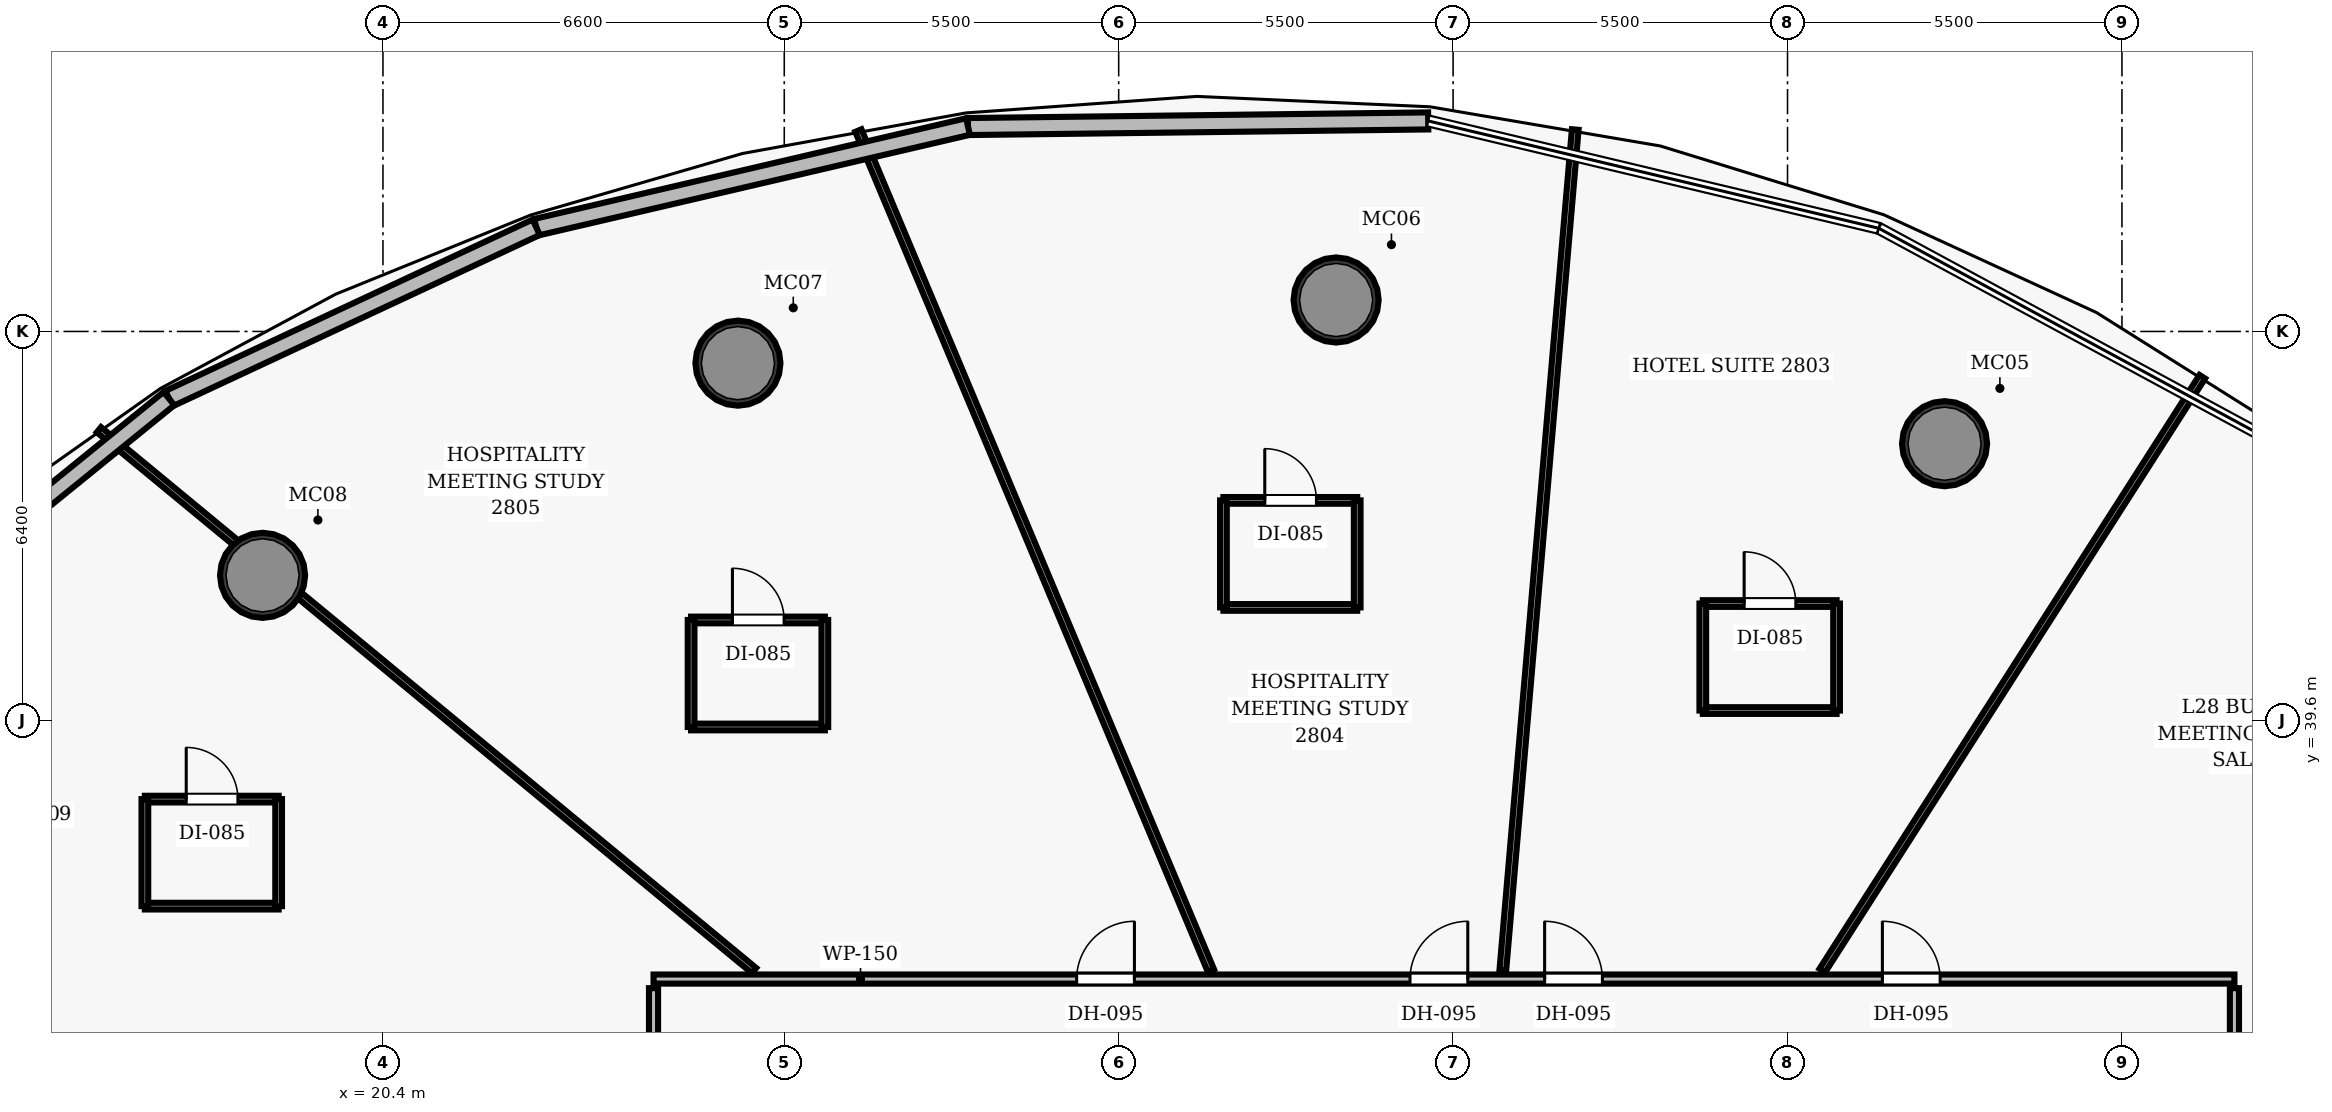
"""IFC4 building model, lengths in metres.
Left out: names, types, materials, properties, quantities, classifications, styles, units other than length and angle.
Written with IfcOpenShell. Run it as: python <this file> out.ifc"""

import sys

from ifc_helpers import new_model, si_unit, direction, frame, frame_2d, origin, origin_2d, place, context, subcontext, project, spatial, rectangle, hollow_circle, extrude, element, fill, save


model = new_model("IFC4")
c1 = context("Model", 3, precision=1e-05, world=origin(), true_north=direction((0.0, 1.0)))
c2 = subcontext(c1, "Body", "Model", "MODEL_VIEW")
j1 = project(units=[si_unit("LENGTHUNIT", "METRE"), si_unit("PLANEANGLEUNIT", "RADIAN")], contexts=[c1])
p1 = place(None, origin())
s1 = spatial("IfcSite", under=j1, at=p1, CompositionType="ELEMENT")
p2 = place(p1, origin())
s2 = spatial("IfcBuilding", under=s1, at=p2, CompositionType="ELEMENT")
p3 = place(p2, frame((0.0, 0.0, 116.8)))
s3 = spatial("IfcBuildingStorey", under=s2, at=p3, CompositionType="ELEMENT", Elevation=116.8)
for number, where, z_axis, x_axis in (
    (1, (46.083, 44.154, 0.0), (0.0, 0.0, 1.0), (1.0, 0.0, 0.0)),
    (2, (36.076, 46.517, 0.0), (0.0, 0.0, 1.0), (1.0, 0.0, 0.0)),
    (3, (26.238, 45.479, 0.0), (0.0, 0.0, 1.0), (1.0, 0.0, 0.0)),
    (4, (18.42, 41.989, 0.0), (0.0, 0.0, 1.0), (1.0, 0.0, 0.0)),
):
    element("IfcColumn", number, at=place(p3, frame(where, z_axis=z_axis, x_axis=x_axis)), inside=s3, PredefinedType="COLUMN", context=c2, shape_type="SweptSolid", body=[
        extrude(hollow_circle(Radius=0.7, WallThickness=0.055, at=origin_2d()), origin(), (0.0, 0.0, 1.0), 3.5),
    ])
p4 = place(p3, frame((24.85, 35.35, 0.0), z_axis=(0.0, 0.0, 1.0), x_axis=(1.0, 0.0, 0.0)))
e5 = element("IfcWall", 5, at=p4, inside=s3, PredefinedType="PARTITIONING", context=c2, shape_type="SweptSolid", body=[
    extrude(rectangle(XDim=26.0, YDim=0.15, at=frame_2d((13.0, 0.0))), origin(), (0.0, 0.0, 1.0), 2.675),
])
p5 = place(p4, frame((20.21, 0.0, 0.0)))
e6 = element("IfcOpeningElement", 6, at=p5, cuts=e5, PredefinedType="OPENING", context=c2, shape_type="SweptSolid", body=[
    extrude(rectangle(XDim=0.95, YDim=2.15, at=frame_2d((0.475, 1.075))), frame((0.0, 0.085, 0.0), z_axis=(0.0, -1.0, 0.0), x_axis=(1.0, 0.0, 0.0)), (0.0, 0.0, 1.0), 0.17),
])
p6 = place(p4, frame((14.655, 0.0, 0.0)))
e7 = element("IfcOpeningElement", 7, at=p6, cuts=e5, PredefinedType="OPENING", context=c2, shape_type="SweptSolid", body=[
    extrude(rectangle(XDim=0.95, YDim=2.15, at=frame_2d((0.475, 1.075))), frame((0.0, 0.085, 0.0), z_axis=(0.0, -1.0, 0.0), x_axis=(1.0, 0.0, 0.0)), (0.0, 0.0, 1.0), 0.17),
])
p7 = place(p4, frame((12.441, 0.0, 0.0)))
e8 = element("IfcOpeningElement", 8, at=p7, cuts=e5, PredefinedType="OPENING", context=c2, shape_type="SweptSolid", body=[
    extrude(rectangle(XDim=0.95, YDim=2.15, at=frame_2d((0.475, 1.075))), frame((0.0, 0.085, 0.0), z_axis=(0.0, -1.0, 0.0), x_axis=(1.0, 0.0, 0.0)), (0.0, 0.0, 1.0), 0.17),
])
p8 = place(p4, frame((6.959, 0.0, 0.0)))
e9 = element("IfcOpeningElement", 9, at=p8, cuts=e5, PredefinedType="OPENING", context=c2, shape_type="SweptSolid", body=[
    extrude(rectangle(XDim=0.95, YDim=2.15, at=frame_2d((0.475, 1.075))), frame((0.0, 0.085, 0.0), z_axis=(0.0, -1.0, 0.0), x_axis=(1.0, 0.0, 0.0)), (0.0, 0.0, 1.0), 0.17),
])
p9 = place(p3, frame((24.85, 27.08, 0.0), z_axis=(0.0, 0.0, 1.0), x_axis=(0.0, 1.0, 0.0)))
e10 = element("IfcWall", 10, at=p9, inside=s3, PredefinedType="PARTITIONING", context=c2, shape_type="SweptSolid", body=[
    extrude(rectangle(XDim=8.12, YDim=0.15, at=frame_2d((4.06, 0.0))), origin(), (0.0, 0.0, 1.0), 2.675),
])
p10 = place(p9, frame((4.288, 0.0, 0.0)))
e11 = element("IfcOpeningElement", 11, at=p10, cuts=e10, PredefinedType="OPENING", context=c2, shape_type="SweptSolid", body=[
    extrude(rectangle(XDim=0.95, YDim=2.15, at=frame_2d((0.475, 1.075))), frame((0.0, 0.085, 0.0), z_axis=(0.0, -1.0, 0.0), x_axis=(1.0, 0.0, 0.0)), (0.0, 0.0, 1.0), 0.17),
])
p11 = place(p3, frame((50.85, 27.08, 0.0), z_axis=(0.0, 0.0, 1.0), x_axis=(0.0, 1.0, 0.0)))
e12 = element("IfcWall", 12, at=p11, inside=s3, PredefinedType="PARTITIONING", context=c2, shape_type="SweptSolid", body=[
    extrude(rectangle(XDim=8.12, YDim=0.15, at=frame_2d((4.06, 0.0))), origin(), (0.0, 0.0, 1.0), 2.675),
])
p12 = place(p11, frame((1.179, 0.0, 0.0)))
e13 = element("IfcOpeningElement", 13, at=p12, cuts=e12, PredefinedType="OPENING", context=c2, shape_type="SweptSolid", body=[
    extrude(rectangle(XDim=0.95, YDim=2.15, at=frame_2d((0.475, 1.075))), frame((0.0, 0.085, 0.0), z_axis=(0.0, -1.0, 0.0), x_axis=(1.0, 0.0, 0.0)), (0.0, 0.0, 1.0), 0.17),
])
p13 = place(p3, frame((50.99, 33.407, 0.0), z_axis=(0.0, 0.0, 1.0), x_axis=(0.868694051494, 0.495349013221, 0.0)))
e14 = element("IfcWall", 14, at=p13, inside=s3, PredefinedType="PARTITIONING", context=c2, shape_type="SweptSolid", body=[
    extrude(rectangle(XDim=8.723, YDim=0.11, at=frame_2d((4.361, 0.0))), origin(), (0.0, 0.0, 1.0), 2.675),
])
p14 = place(p3, frame((44.073, 35.49, 0.0), z_axis=(0.0, 0.0, 1.0), x_axis=(0.538998120289, 0.842306966803, 0.0)))
e15 = element("IfcWall", 15, at=p14, inside=s3, PredefinedType="PARTITIONING", context=c2, shape_type="SweptSolid", body=[
    extrude(rectangle(XDim=11.593, YDim=0.11, at=frame_2d((5.797, 0.0))), origin(), (0.0, 0.0, 1.0), 2.675),
])
p15 = place(p3, frame((38.817, 35.49, 0.0), z_axis=(0.0, 0.0, 1.0), x_axis=(0.085823630401, 0.996310345457, 0.0)))
e16 = element("IfcWall", 16, at=p15, inside=s3, PredefinedType="PARTITIONING", context=c2, shape_type="SweptSolid", body=[
    extrude(rectangle(XDim=13.882, YDim=0.11, at=frame_2d((6.941, 0.0))), origin(), (0.0, 0.0, 1.0), 2.675),
])
p16 = place(p3, frame((34.017, 35.49, 0.0), z_axis=(0.0, 0.0, 1.0), x_axis=(-0.387024405225, 0.922069471222, 0.0)))
e17 = element("IfcWall", 17, at=p16, inside=s3, PredefinedType="PARTITIONING", context=c2, shape_type="SweptSolid", body=[
    extrude(rectangle(XDim=14.981, YDim=0.11, at=frame_2d((7.491, 0.0))), origin(), (0.0, 0.0, 1.0), 2.675),
])
p17 = place(p3, frame((26.503, 35.49, 0.0), z_axis=(0.0, 0.0, 1.0), x_axis=(-0.771199330671, 0.636593742015, 0.0)))
e18 = element("IfcWall", 18, at=p17, inside=s3, PredefinedType="PARTITIONING", context=c2, shape_type="SweptSolid", body=[
    extrude(rectangle(XDim=13.971, YDim=0.11, at=frame_2d((6.986, 0.0))), origin(), (0.0, 0.0, 1.0), 2.675),
])
p18 = place(p3, frame((42.107, 39.766, 0.0), z_axis=(0.0, 0.0, 1.0), x_axis=(1.0, 0.0, 0.0)))
e19 = element("IfcWall", 19, at=p18, inside=s3, PredefinedType="PARTITIONING", context=c2, shape_type="SweptSolid", body=[
    extrude(rectangle(XDim=2.2, YDim=0.11, at=frame_2d((1.1, 0.0))), origin(), (0.0, 0.0, 1.0), 2.675),
])
p19 = place(p3, frame((42.107, 41.526, 0.0), z_axis=(0.0, 0.0, 1.0), x_axis=(1.0, 0.0, 0.0)))
e20 = element("IfcWall", 20, at=p19, inside=s3, PredefinedType="PARTITIONING", context=c2, shape_type="SweptSolid", body=[
    extrude(rectangle(XDim=2.2, YDim=0.11, at=frame_2d((1.1, 0.0))), origin(), (0.0, 0.0, 1.0), 2.675),
])
p20 = place(p19, frame((0.68, 0.0, 0.0)))
e21 = element("IfcOpeningElement", 21, at=p20, cuts=e20, PredefinedType="OPENING", context=c2, shape_type="SweptSolid", body=[
    extrude(rectangle(XDim=0.85, YDim=2.1, at=frame_2d((0.425, 1.05))), frame((0.0, 0.065, 0.0), z_axis=(0.0, -1.0, 0.0), x_axis=(1.0, 0.0, 0.0)), (0.0, 0.0, 1.0), 0.13),
])
for number, where, z_axis, x_axis in (
    (22, (42.107, 39.766, 0.0), (0.0, 0.0, 1.0), (0.0, 1.0, 0.0)),
    (23, (44.307, 39.766, 0.0), (0.0, 0.0, 1.0), (0.0, 1.0, 0.0)),
):
    element("IfcWall", number, at=place(p3, frame(where, z_axis=z_axis, x_axis=x_axis)), inside=s3, PredefinedType="PARTITIONING", context=c2, shape_type="SweptSolid", body=[
        extrude(rectangle(XDim=1.76, YDim=0.11, at=frame_2d((0.88, 0.0))), origin(), (0.0, 0.0, 1.0), 2.675),
    ])
p21 = place(p3, frame((34.223, 41.462, 0.0), z_axis=(0.0, 0.0, 1.0), x_axis=(1.0, 0.0, 0.0)))
e24 = element("IfcWall", 24, at=p21, inside=s3, PredefinedType="PARTITIONING", context=c2, shape_type="SweptSolid", body=[
    extrude(rectangle(XDim=2.2, YDim=0.11, at=frame_2d((1.1, 0.0))), origin(), (0.0, 0.0, 1.0), 2.675),
])
p22 = place(p3, frame((34.223, 43.222, 0.0), z_axis=(0.0, 0.0, 1.0), x_axis=(1.0, 0.0, 0.0)))
e25 = element("IfcWall", 25, at=p22, inside=s3, PredefinedType="PARTITIONING", context=c2, shape_type="SweptSolid", body=[
    extrude(rectangle(XDim=2.2, YDim=0.11, at=frame_2d((1.1, 0.0))), origin(), (0.0, 0.0, 1.0), 2.675),
])
p23 = place(p22, frame((0.68, 0.0, 0.0)))
e26 = element("IfcOpeningElement", 26, at=p23, cuts=e25, PredefinedType="OPENING", context=c2, shape_type="SweptSolid", body=[
    extrude(rectangle(XDim=0.85, YDim=2.1, at=frame_2d((0.425, 1.05))), frame((0.0, 0.065, 0.0), z_axis=(0.0, -1.0, 0.0), x_axis=(1.0, 0.0, 0.0)), (0.0, 0.0, 1.0), 0.13),
])
for number, where, z_axis, x_axis in (
    (27, (34.223, 41.462, 0.0), (0.0, 0.0, 1.0), (0.0, 1.0, 0.0)),
    (28, (36.423, 41.462, 0.0), (0.0, 0.0, 1.0), (0.0, 1.0, 0.0)),
):
    element("IfcWall", number, at=place(p3, frame(where, z_axis=z_axis, x_axis=x_axis)), inside=s3, PredefinedType="PARTITIONING", context=c2, shape_type="SweptSolid", body=[
        extrude(rectangle(XDim=1.76, YDim=0.11, at=frame_2d((0.88, 0.0))), origin(), (0.0, 0.0, 1.0), 2.675),
    ])
p24 = place(p3, frame((25.468, 39.495, 0.0), z_axis=(0.0, 0.0, 1.0), x_axis=(1.0, 0.0, 0.0)))
e29 = element("IfcWall", 29, at=p24, inside=s3, PredefinedType="PARTITIONING", context=c2, shape_type="SweptSolid", body=[
    extrude(rectangle(XDim=2.2, YDim=0.11, at=frame_2d((1.1, 0.0))), origin(), (0.0, 0.0, 1.0), 2.675),
])
p25 = place(p3, frame((25.468, 41.255, 0.0), z_axis=(0.0, 0.0, 1.0), x_axis=(1.0, 0.0, 0.0)))
e30 = element("IfcWall", 30, at=p25, inside=s3, PredefinedType="PARTITIONING", context=c2, shape_type="SweptSolid", body=[
    extrude(rectangle(XDim=2.2, YDim=0.11, at=frame_2d((1.1, 0.0))), origin(), (0.0, 0.0, 1.0), 2.675),
])
p26 = place(p25, frame((0.68, 0.0, 0.0)))
e31 = element("IfcOpeningElement", 31, at=p26, cuts=e30, PredefinedType="OPENING", context=c2, shape_type="SweptSolid", body=[
    extrude(rectangle(XDim=0.85, YDim=2.1, at=frame_2d((0.425, 1.05))), frame((0.0, 0.065, 0.0), z_axis=(0.0, -1.0, 0.0), x_axis=(1.0, 0.0, 0.0)), (0.0, 0.0, 1.0), 0.13),
])
for number, where, z_axis, x_axis in (
    (32, (25.468, 39.495, 0.0), (0.0, 0.0, 1.0), (0.0, 1.0, 0.0)),
    (33, (27.667, 39.495, 0.0), (0.0, 0.0, 1.0), (0.0, 1.0, 0.0)),
):
    element("IfcWall", number, at=place(p3, frame(where, z_axis=z_axis, x_axis=x_axis)), inside=s3, PredefinedType="PARTITIONING", context=c2, shape_type="SweptSolid", body=[
        extrude(rectangle(XDim=1.76, YDim=0.11, at=frame_2d((0.88, 0.0))), origin(), (0.0, 0.0, 1.0), 2.675),
    ])
p27 = place(p3, frame((16.484, 36.549, 0.0), z_axis=(0.0, 0.0, 1.0), x_axis=(1.0, 0.0, 0.0)))
e34 = element("IfcWall", 34, at=p27, inside=s3, PredefinedType="PARTITIONING", context=c2, shape_type="SweptSolid", body=[
    extrude(rectangle(XDim=2.2, YDim=0.11, at=frame_2d((1.1, 0.0))), origin(), (0.0, 0.0, 1.0), 2.675),
])
p28 = place(p3, frame((16.484, 38.309, 0.0), z_axis=(0.0, 0.0, 1.0), x_axis=(1.0, 0.0, 0.0)))
e35 = element("IfcWall", 35, at=p28, inside=s3, PredefinedType="PARTITIONING", context=c2, shape_type="SweptSolid", body=[
    extrude(rectangle(XDim=2.2, YDim=0.11, at=frame_2d((1.1, 0.0))), origin(), (0.0, 0.0, 1.0), 2.675),
])
p29 = place(p28, frame((0.68, 0.0, 0.0)))
e36 = element("IfcOpeningElement", 36, at=p29, cuts=e35, PredefinedType="OPENING", context=c2, shape_type="SweptSolid", body=[
    extrude(rectangle(XDim=0.85, YDim=2.1, at=frame_2d((0.425, 1.05))), frame((0.0, 0.065, 0.0), z_axis=(0.0, -1.0, 0.0), x_axis=(1.0, 0.0, 0.0)), (0.0, 0.0, 1.0), 0.13),
])
for number, where, z_axis, x_axis in (
    (37, (16.484, 36.549, 0.0), (0.0, 0.0, 1.0), (0.0, 1.0, 0.0)),
    (38, (18.684, 36.549, 0.0), (0.0, 0.0, 1.0), (0.0, 1.0, 0.0)),
):
    element("IfcWall", number, at=place(p3, frame(where, z_axis=z_axis, x_axis=x_axis)), inside=s3, PredefinedType="PARTITIONING", context=c2, shape_type="SweptSolid", body=[
        extrude(rectangle(XDim=1.76, YDim=0.11, at=frame_2d((0.88, 0.0))), origin(), (0.0, 0.0, 1.0), 2.675),
    ])
p30 = place(p3, frame((30.022, 49.37, 0.0), z_axis=(0.0, 0.0, 1.0), x_axis=(0.999925278026, 0.012224498577, 0.0)))
e39 = element("IfcWall", 39, at=p30, inside=s3, PredefinedType="SOLIDWALL", context=c2, shape_type="SweptSolid", body=[
    extrude(rectangle(XDim=7.569, YDim=0.28, at=frame_2d((3.785, 0.0))), origin(), (0.0, 0.0, 1.0), 3.26),
])
p31 = place(p3, frame((22.921, 47.714, 0.0), z_axis=(0.0, 0.0, 1.0), x_axis=(0.97387799493, 0.227071907093, 0.0)))
e40 = element("IfcWall", 40, at=p31, inside=s3, PredefinedType="SOLIDWALL", context=c2, shape_type="SweptSolid", body=[
    extrude(rectangle(XDim=7.292, YDim=0.28, at=frame_2d((3.646, 0.0))), origin(), (0.0, 0.0, 1.0), 3.26),
])
p32 = place(p3, frame((16.881, 44.896, 0.0), z_axis=(0.0, 0.0, 1.0), x_axis=(0.906215890007, 0.422815279642, 0.0)))
e41 = element("IfcWall", 41, at=p32, inside=s3, PredefinedType="SOLIDWALL", context=c2, shape_type="SweptSolid", body=[
    extrude(rectangle(XDim=6.665, YDim=0.28, at=frame_2d((3.333, 0.0))), origin(), (0.0, 0.0, 1.0), 3.26),
])
p33 = place(p3, frame((12.359, 41.227, 0.0), z_axis=(0.0, 0.0, 1.0), x_axis=(0.776513988791, 0.630100012071, 0.0)))
e42 = element("IfcWall", 42, at=p33, inside=s3, PredefinedType="SOLIDWALL", context=c2, shape_type="SweptSolid", body=[
    extrude(rectangle(XDim=5.823, YDim=0.28, at=frame_2d((2.911, 0.0))), origin(), (0.0, 0.0, 1.0), 3.26),
])
p34 = place(p5, origin())
e43 = element("IfcDoor", 43, at=p34, inside=s3, OperationType="SINGLE_SWING_LEFT", PredefinedType="DOOR", context=c2, shape_type="SweptSolid", body=[
    extrude(rectangle(XDim=0.95, YDim=2.15, at=frame_2d((0.475, 1.075))), frame((0.0, 0.025, 0.0), z_axis=(0.0, -1.0, 0.0), x_axis=(1.0, 0.0, 0.0)), (0.0, 0.0, 1.0), 0.05),
])
fill(e6, e43)
p35 = place(p6, origin())
e44 = element("IfcDoor", 44, at=p35, inside=s3, OperationType="SINGLE_SWING_LEFT", PredefinedType="DOOR", context=c2, shape_type="SweptSolid", body=[
    extrude(rectangle(XDim=0.95, YDim=2.15, at=frame_2d((0.475, 1.075))), frame((0.0, 0.025, 0.0), z_axis=(0.0, -1.0, 0.0), x_axis=(1.0, 0.0, 0.0)), (0.0, 0.0, 1.0), 0.05),
])
fill(e7, e44)
p36 = place(p20, origin())
e45 = element("IfcDoor", 45, at=p36, inside=s3, OperationType="SINGLE_SWING_LEFT", PredefinedType="DOOR", context=c2, shape_type="SweptSolid", body=[
    extrude(rectangle(XDim=0.85, YDim=2.1, at=frame_2d((0.425, 1.05))), frame((0.0, 0.025, 0.0), z_axis=(0.0, -1.0, 0.0), x_axis=(1.0, 0.0, 0.0)), (0.0, 0.0, 1.0), 0.05),
])
fill(e21, e45)
p37 = place(p7, origin())
e46 = element("IfcDoor", 46, at=p37, inside=s3, OperationType="SINGLE_SWING_RIGHT", PredefinedType="DOOR", context=c2, shape_type="SweptSolid", body=[
    extrude(rectangle(XDim=0.95, YDim=2.15, at=frame_2d((0.475, 1.075))), frame((0.0, 0.025, 0.0), z_axis=(0.0, -1.0, 0.0), x_axis=(1.0, 0.0, 0.0)), (0.0, 0.0, 1.0), 0.05),
])
fill(e8, e46)
p38 = place(p23, origin())
e47 = element("IfcDoor", 47, at=p38, inside=s3, OperationType="SINGLE_SWING_LEFT", PredefinedType="DOOR", context=c2, shape_type="SweptSolid", body=[
    extrude(rectangle(XDim=0.85, YDim=2.1, at=frame_2d((0.425, 1.05))), frame((0.0, 0.025, 0.0), z_axis=(0.0, -1.0, 0.0), x_axis=(1.0, 0.0, 0.0)), (0.0, 0.0, 1.0), 0.05),
])
fill(e26, e47)
p39 = place(p8, origin())
e48 = element("IfcDoor", 48, at=p39, inside=s3, OperationType="SINGLE_SWING_RIGHT", PredefinedType="DOOR", context=c2, shape_type="SweptSolid", body=[
    extrude(rectangle(XDim=0.95, YDim=2.15, at=frame_2d((0.475, 1.075))), frame((0.0, 0.025, 0.0), z_axis=(0.0, -1.0, 0.0), x_axis=(1.0, 0.0, 0.0)), (0.0, 0.0, 1.0), 0.05),
])
fill(e9, e48)
p40 = place(p26, origin())
e49 = element("IfcDoor", 49, at=p40, inside=s3, OperationType="SINGLE_SWING_LEFT", PredefinedType="DOOR", context=c2, shape_type="SweptSolid", body=[
    extrude(rectangle(XDim=0.85, YDim=2.1, at=frame_2d((0.425, 1.05))), frame((0.0, 0.025, 0.0), z_axis=(0.0, -1.0, 0.0), x_axis=(1.0, 0.0, 0.0)), (0.0, 0.0, 1.0), 0.05),
])
fill(e31, e49)
p41 = place(p29, origin())
e50 = element("IfcDoor", 50, at=p41, inside=s3, OperationType="SINGLE_SWING_LEFT", PredefinedType="DOOR", context=c2, shape_type="SweptSolid", body=[
    extrude(rectangle(XDim=0.85, YDim=2.1, at=frame_2d((0.425, 1.05))), frame((0.0, 0.025, 0.0), z_axis=(0.0, -1.0, 0.0), x_axis=(1.0, 0.0, 0.0)), (0.0, 0.0, 1.0), 0.05),
])
fill(e36, e50)
save(model, sys.argv[1])
